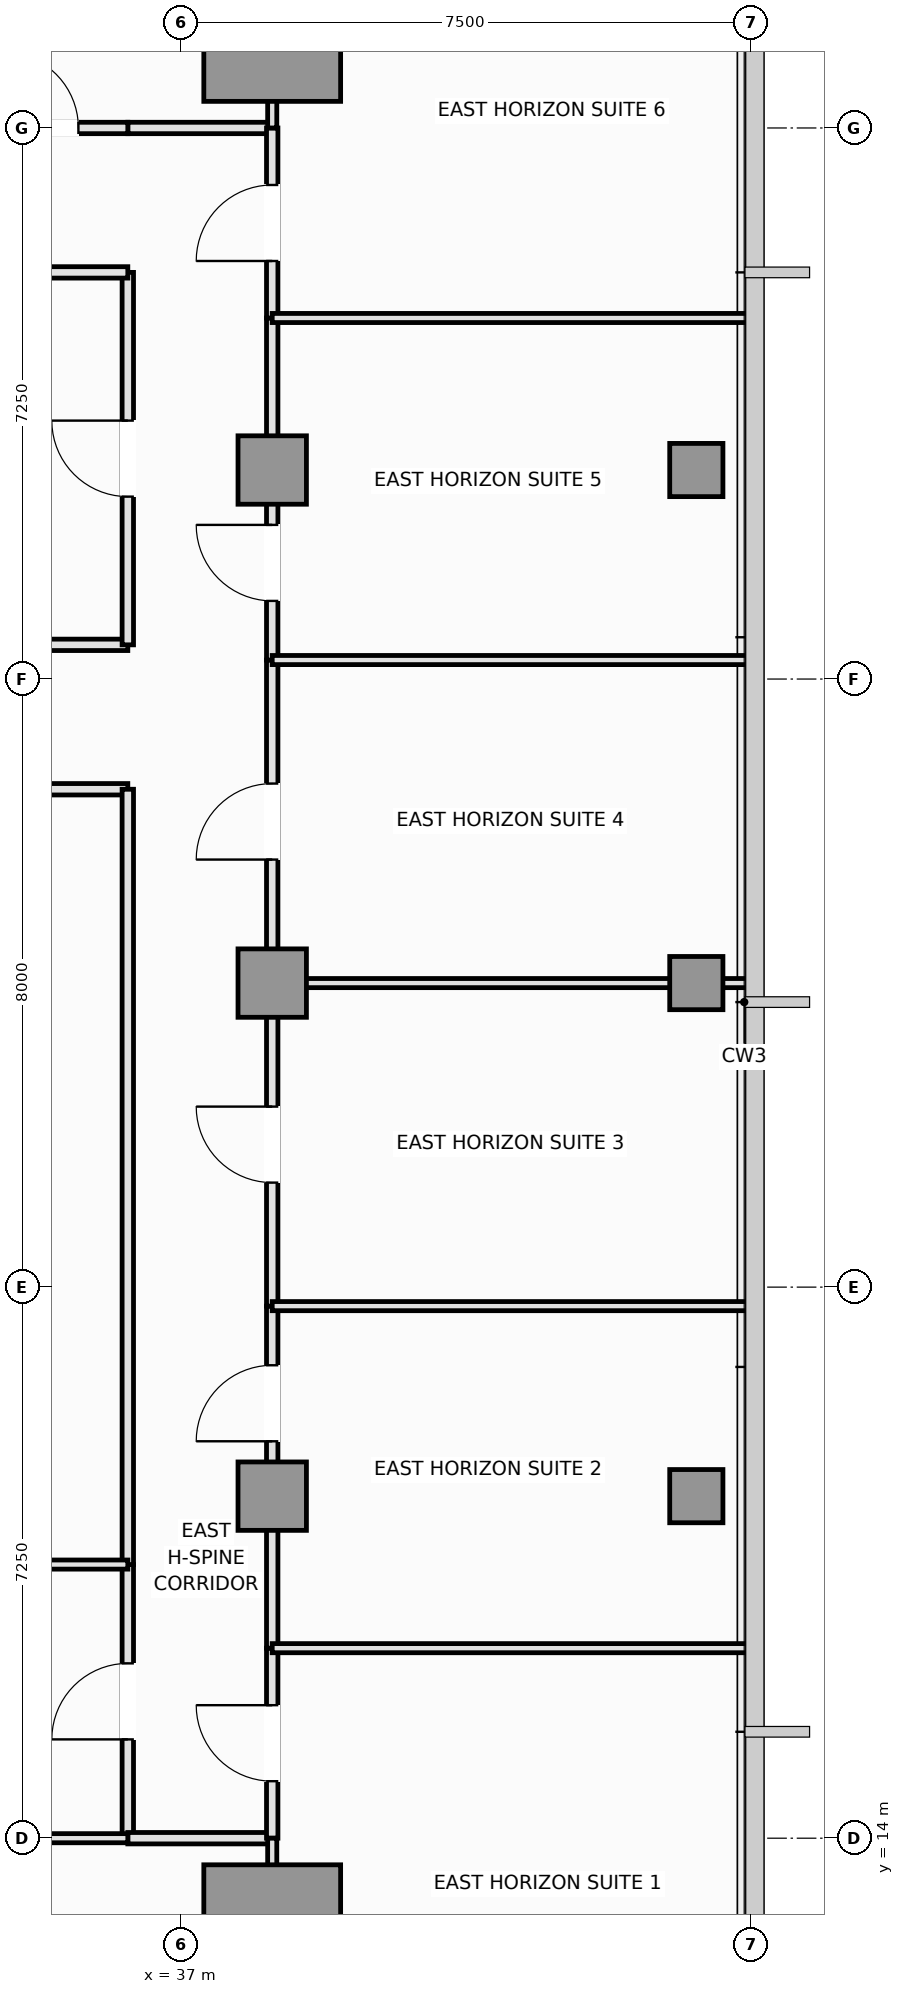
"""IFC4 building model, lengths in metres.
Left out: names, types, materials, properties, quantities, classifications, styles, units other than length and angle.
Written with IfcOpenShell. Run it as: python <this file> out.ifc"""

import sys

from ifc_helpers import new_model, si_unit, direction, frame, frame_2d, origin, origin_2d, place, context, subcontext, project, spatial, rectangle, extrude, element, fill, save


model = new_model("IFC4")
c1 = context("Model", 3, precision=1e-05, world=origin(), true_north=direction((0.0, 1.0)))
c2 = subcontext(c1, "Body", "Model", "MODEL_VIEW")
j1 = project(units=[si_unit("LENGTHUNIT", "METRE"), si_unit("PLANEANGLEUNIT", "RADIAN")], contexts=[c1])
p1 = place(None, origin())
s1 = spatial("IfcSite", under=j1, at=p1, CompositionType="ELEMENT")
p2 = place(p1, origin())
s2 = spatial("IfcBuilding", under=s1, at=p2, CompositionType="ELEMENT")
p3 = place(p2, frame((0.0, 0.0, 281.2)))
s3 = spatial("IfcBuildingStorey", under=s2, at=p3, CompositionType="ELEMENT", Elevation=281.2)
for number, where, z_axis, x_axis in (
    (1, (38.2, 12.75, 0.0), (0.0, 0.0, 1.0), (1.0, 0.0, 0.0)),
    (2, (38.2, 37.75, 0.0), (0.0, 0.0, 1.0), (1.0, 0.0, 0.0)),
):
    element("IfcColumn", number, at=place(p3, frame(where, z_axis=z_axis, x_axis=x_axis)), inside=s3, PredefinedType="COLUMN", context=c2, shape_type="SweptSolid", body=[
        extrude(rectangle(XDim=1.8, YDim=1.8, at=origin_2d()), origin(), (0.0, 0.0, 1.0), 3.55),
    ])
for number, where, z_axis, x_axis in (
    (3, (38.2, 18.5, 0.0), (0.0, 0.0, 1.0), (1.0, 0.0, 0.0)),
    (4, (38.2, 25.25, 0.0), (0.0, 0.0, 1.0), (1.0, 0.0, 0.0)),
    (5, (38.2, 32.0, 0.0), (0.0, 0.0, 1.0), (1.0, 0.0, 0.0)),
):
    element("IfcColumn", number, at=place(p3, frame(where, z_axis=z_axis, x_axis=x_axis)), inside=s3, PredefinedType="COLUMN", context=c2, shape_type="SweptSolid", body=[
        extrude(rectangle(XDim=0.9, YDim=0.9, at=origin_2d()), origin(), (0.0, 0.0, 1.0), 3.55),
    ])
for number, where, z_axis, x_axis in (
    (6, (43.78, 18.5, 0.0), (0.0, 0.0, 1.0), (1.0, 0.0, 0.0)),
    (7, (43.78, 25.25, 0.0), (0.0, 0.0, 1.0), (1.0, 0.0, 0.0)),
    (8, (43.78, 32.0, 0.0), (0.0, 0.0, 1.0), (1.0, 0.0, 0.0)),
):
    element("IfcColumn", number, at=place(p3, frame(where, z_axis=z_axis, x_axis=x_axis)), inside=s3, PredefinedType="COLUMN", context=c2, shape_type="SweptSolid", body=[
        extrude(rectangle(XDim=0.7, YDim=0.7, at=origin_2d()), origin(), (0.0, 0.0, 1.0), 3.55),
    ])
p4 = place(p3, frame((26.79, 29.7, 0.0), z_axis=(0.0, 0.0, 1.0), x_axis=(1.0, 0.0, 0.0)))
e9 = element("IfcWall", 9, at=p4, inside=s3, PredefinedType="PARTITIONING", context=c2, shape_type="SweptSolid", body=[
    extrude(rectangle(XDim=9.51, YDim=0.15, at=frame_2d((4.755, 0.0))), origin(), (0.0, 0.0, 1.0), 3.39),
])
p5 = place(p3, frame((23.5, 27.8, 0.0), z_axis=(0.0, 0.0, 1.0), x_axis=(1.0, 0.0, 0.0)))
e10 = element("IfcWall", 10, at=p5, inside=s3, PredefinedType="PARTITIONING", context=c2, shape_type="SweptSolid", body=[
    extrude(rectangle(XDim=12.8, YDim=0.15, at=frame_2d((6.4, 0.0))), origin(), (0.0, 0.0, 1.0), 3.39),
])
p6 = place(p5, frame((5.9, 0.0, 0.0)))
e11 = element("IfcOpeningElement", 11, at=p6, cuts=e10, PredefinedType="OPENING", context=c2, shape_type="SweptSolid", body=[
    extrude(rectangle(XDim=1.0, YDim=2.15, at=frame_2d((0.5, 1.075))), frame((0.0, 0.085, 0.0), z_axis=(0.0, -1.0, 0.0), x_axis=(1.0, 0.0, 0.0)), (0.0, 0.0, 1.0), 0.17),
])
p7 = place(p3, frame((36.3, 29.7, 0.0), z_axis=(0.0, 0.0, 1.0), x_axis=(0.0, 1.0, 0.0)))
e12 = element("IfcWall", 12, at=p7, inside=s3, PredefinedType="PARTITIONING", context=c2, shape_type="SweptSolid", body=[
    extrude(rectangle(XDim=4.9, YDim=0.15, at=frame_2d((2.45, 0.0))), origin(), (0.0, 0.0, 1.0), 3.39),
])
p8 = place(p7, frame((1.95, 0.0, 0.0)))
e13 = element("IfcOpeningElement", 13, at=p8, cuts=e12, PredefinedType="OPENING", context=c2, shape_type="SweptSolid", body=[
    extrude(rectangle(XDim=1.0, YDim=2.15, at=frame_2d((0.5, 1.075))), frame((0.0, 0.085, 0.0), z_axis=(0.0, -1.0, 0.0), x_axis=(1.0, 0.0, 0.0)), (0.0, 0.0, 1.0), 0.17),
])
p9 = place(p3, frame((36.3, 14.0, 0.0), z_axis=(0.0, 0.0, 1.0), x_axis=(0.0, 1.0, 0.0)))
e14 = element("IfcWall", 14, at=p9, inside=s3, PredefinedType="PARTITIONING", context=c2, shape_type="SweptSolid", body=[
    extrude(rectangle(XDim=3.6, YDim=0.15, at=frame_2d((1.8, 0.0))), origin(), (0.0, 0.0, 1.0), 3.39),
])
p10 = place(p9, frame((1.3, 0.0, 0.0)))
e15 = element("IfcOpeningElement", 15, at=p10, cuts=e14, PredefinedType="OPENING", context=c2, shape_type="SweptSolid", body=[
    extrude(rectangle(XDim=1.0, YDim=2.15, at=frame_2d((0.5, 1.075))), frame((0.0, 0.085, 0.0), z_axis=(0.0, -1.0, 0.0), x_axis=(1.0, 0.0, 0.0)), (0.0, 0.0, 1.0), 0.17),
])
p11 = place(p3, frame((36.3, 17.6, 0.0), z_axis=(0.0, 0.0, 1.0), x_axis=(0.0, 1.0, 0.0)))
e16 = element("IfcWall", 16, at=p11, inside=s3, PredefinedType="PARTITIONING", context=c2, shape_type="SweptSolid", body=[
    extrude(rectangle(XDim=10.2, YDim=0.15, at=frame_2d((5.1, 0.0))), origin(), (0.0, 0.0, 1.0), 3.39),
])
for number, where, z_axis, x_axis in (
    (17, (36.3, 14.0, 0.0), (0.0, 0.0, 1.0), (1.0, 0.0, 0.0)),
    (18, (36.3, 36.5, 0.0), (0.0, 0.0, 1.0), (1.0, 0.0, 0.0)),
):
    element("IfcWall", number, at=place(p3, frame(where, z_axis=z_axis, x_axis=x_axis)), inside=s3, PredefinedType="PARTITIONING", context=c2, shape_type="SweptSolid", body=[
        extrude(rectangle(XDim=1.9, YDim=0.15, at=frame_2d((0.95, 0.0))), origin(), (0.0, 0.0, 1.0), 3.39),
    ])
p12 = place(p3, frame((38.2, 14.0, 0.0), z_axis=(0.0, 0.0, 1.0), x_axis=(0.0, 1.0, 0.0)))
e19 = element("IfcWall", 19, at=p12, inside=s3, PredefinedType="PARTITIONING", context=c2, shape_type="SweptSolid", body=[
    extrude(rectangle(XDim=2.5, YDim=0.15, at=frame_2d((1.25, 0.0))), origin(), (0.0, 0.0, 1.0), 2.99),
])
p13 = place(p12, frame((0.75, 0.0, 0.0)))
e20 = element("IfcOpeningElement", 20, at=p13, cuts=e19, PredefinedType="OPENING", context=c2, shape_type="SweptSolid", body=[
    extrude(rectangle(XDim=1.0, YDim=2.15, at=frame_2d((0.5, 1.075))), frame((0.0, 0.085, 0.0), z_axis=(0.0, -1.0, 0.0), x_axis=(1.0, 0.0, 0.0)), (0.0, 0.0, 1.0), 0.17),
])
p14 = place(p3, frame((38.2, 16.5, 0.0), z_axis=(0.0, 0.0, 1.0), x_axis=(0.0, 1.0, 0.0)))
e21 = element("IfcWall", 21, at=p14, inside=s3, PredefinedType="PARTITIONING", context=c2, shape_type="SweptSolid", body=[
    extrude(rectangle(XDim=4.5, YDim=0.15, at=frame_2d((2.25, 0.0))), origin(), (0.0, 0.0, 1.0), 2.99),
])
p15 = place(p14, frame((2.722, 0.0, 0.0)))
e22 = element("IfcOpeningElement", 22, at=p15, cuts=e21, PredefinedType="OPENING", context=c2, shape_type="SweptSolid", body=[
    extrude(rectangle(XDim=1.0, YDim=2.15, at=frame_2d((0.5, 1.075))), frame((0.0, 0.085, 0.0), z_axis=(0.0, -1.0, 0.0), x_axis=(1.0, 0.0, 0.0)), (0.0, 0.0, 1.0), 0.17),
])
p16 = place(p3, frame((38.2, 21.0, 0.0), z_axis=(0.0, 0.0, 1.0), x_axis=(0.0, 1.0, 0.0)))
e23 = element("IfcWall", 23, at=p16, inside=s3, PredefinedType="PARTITIONING", context=c2, shape_type="SweptSolid", body=[
    extrude(rectangle(XDim=4.25, YDim=0.15, at=frame_2d((2.125, 0.0))), origin(), (0.0, 0.0, 1.0), 2.99),
])
p17 = place(p16, frame((1.625, 0.0, 0.0)))
e24 = element("IfcOpeningElement", 24, at=p17, cuts=e23, PredefinedType="OPENING", context=c2, shape_type="SweptSolid", body=[
    extrude(rectangle(XDim=1.0, YDim=2.15, at=frame_2d((0.5, 1.075))), frame((0.0, 0.085, 0.0), z_axis=(0.0, -1.0, 0.0), x_axis=(1.0, 0.0, 0.0)), (0.0, 0.0, 1.0), 0.17),
])
p18 = place(p3, frame((38.2, 25.25, 0.0), z_axis=(0.0, 0.0, 1.0), x_axis=(0.0, 1.0, 0.0)))
e25 = element("IfcWall", 25, at=p18, inside=s3, PredefinedType="PARTITIONING", context=c2, shape_type="SweptSolid", body=[
    extrude(rectangle(XDim=4.25, YDim=0.15, at=frame_2d((2.125, 0.0))), origin(), (0.0, 0.0, 1.0), 2.99),
])
p19 = place(p18, frame((1.625, 0.0, 0.0)))
e26 = element("IfcOpeningElement", 26, at=p19, cuts=e25, PredefinedType="OPENING", context=c2, shape_type="SweptSolid", body=[
    extrude(rectangle(XDim=1.0, YDim=2.15, at=frame_2d((0.5, 1.075))), frame((0.0, 0.085, 0.0), z_axis=(0.0, -1.0, 0.0), x_axis=(1.0, 0.0, 0.0)), (0.0, 0.0, 1.0), 0.17),
])
p20 = place(p3, frame((38.2, 29.5, 0.0), z_axis=(0.0, 0.0, 1.0), x_axis=(0.0, 1.0, 0.0)))
e27 = element("IfcWall", 27, at=p20, inside=s3, PredefinedType="PARTITIONING", context=c2, shape_type="SweptSolid", body=[
    extrude(rectangle(XDim=4.5, YDim=0.15, at=frame_2d((2.25, 0.0))), origin(), (0.0, 0.0, 1.0), 2.99),
])
p21 = place(p20, frame((0.778, 0.0, 0.0)))
e28 = element("IfcOpeningElement", 28, at=p21, cuts=e27, PredefinedType="OPENING", context=c2, shape_type="SweptSolid", body=[
    extrude(rectangle(XDim=1.0, YDim=2.15, at=frame_2d((0.5, 1.075))), frame((0.0, 0.085, 0.0), z_axis=(0.0, -1.0, 0.0), x_axis=(1.0, 0.0, 0.0)), (0.0, 0.0, 1.0), 0.17),
])
p22 = place(p3, frame((38.2, 34.0, 0.0), z_axis=(0.0, 0.0, 1.0), x_axis=(0.0, 1.0, 0.0)))
e29 = element("IfcWall", 29, at=p22, inside=s3, PredefinedType="PARTITIONING", context=c2, shape_type="SweptSolid", body=[
    extrude(rectangle(XDim=2.5, YDim=0.15, at=frame_2d((1.25, 0.0))), origin(), (0.0, 0.0, 1.0), 2.99),
])
p23 = place(p22, frame((0.75, 0.0, 0.0)))
e30 = element("IfcOpeningElement", 30, at=p23, cuts=e29, PredefinedType="OPENING", context=c2, shape_type="SweptSolid", body=[
    extrude(rectangle(XDim=1.0, YDim=2.15, at=frame_2d((0.5, 1.075))), frame((0.0, 0.085, 0.0), z_axis=(0.0, -1.0, 0.0), x_axis=(1.0, 0.0, 0.0)), (0.0, 0.0, 1.0), 0.17),
])
p24 = place(p3, frame((26.79, 34.6, 0.0), z_axis=(0.0, 0.0, 1.0), x_axis=(1.0, 0.0, 0.0)))
e31 = element("IfcWall", 31, at=p24, inside=s3, PredefinedType="PARTITIONING", context=c2, shape_type="SweptSolid", body=[
    extrude(rectangle(XDim=9.51, YDim=0.15, at=frame_2d((4.755, 0.0))), origin(), (0.0, 0.0, 1.0), 3.39),
])
p25 = place(p3, frame((34.0, 36.5, 0.0), z_axis=(0.0, 0.0, 1.0), x_axis=(1.0, 0.0, 0.0)))
e32 = element("IfcWall", 32, at=p25, inside=s3, PredefinedType="PARTITIONING", context=c2, shape_type="SweptSolid", body=[
    extrude(rectangle(XDim=2.3, YDim=0.15, at=frame_2d((1.15, 0.0))), origin(), (0.0, 0.0, 1.0), 3.39),
])
p26 = place(p25, frame((0.65, 0.0, 0.0)))
e33 = element("IfcOpeningElement", 33, at=p26, cuts=e32, PredefinedType="OPENING", context=c2, shape_type="SweptSolid", body=[
    extrude(rectangle(XDim=1.0, YDim=2.15, at=frame_2d((0.5, 1.075))), frame((0.0, 0.085, 0.0), z_axis=(0.0, -1.0, 0.0), x_axis=(1.0, 0.0, 0.0)), (0.0, 0.0, 1.0), 0.17),
])
for number, where, z_axis, x_axis in (
    (34, (23.5, 17.6, 0.0), (0.0, 0.0, 1.0), (1.0, 0.0, 0.0)),
    (35, (23.5, 14.0, 0.0), (0.0, 0.0, 1.0), (1.0, 0.0, 0.0)),
):
    element("IfcWall", number, at=place(p3, frame(where, z_axis=z_axis, x_axis=x_axis)), inside=s3, PredefinedType="PARTITIONING", context=c2, shape_type="SweptSolid", body=[
        extrude(rectangle(XDim=12.8, YDim=0.12, at=frame_2d((6.4, 0.0))), origin(), (0.0, 0.0, 1.0), 3.39),
    ])
p27 = place(p3, frame((38.2, 6.01, 0.0), z_axis=(0.0, 0.0, 1.0), x_axis=(0.0, 1.0, 0.0)))
e36 = element("IfcWall", 36, at=p27, inside=s3, PredefinedType="PARTITIONING", context=c2, shape_type="SweptSolid", body=[
    extrude(rectangle(XDim=7.99, YDim=0.12, at=frame_2d((3.995, 0.0))), origin(), (0.0, 0.0, 1.0), 2.99),
])
p28 = place(p3, frame((38.2, 36.5, 0.0), z_axis=(0.0, 0.0, 1.0), x_axis=(0.0, 1.0, 0.0)))
e37 = element("IfcWall", 37, at=p28, inside=s3, PredefinedType="PARTITIONING", context=c2, shape_type="SweptSolid", body=[
    extrude(rectangle(XDim=7.49, YDim=0.12, at=frame_2d((3.745, 0.0))), origin(), (0.0, 0.0, 1.0), 2.99),
])
for number, where, z_axis, x_axis in (
    (38, (38.2, 16.5, 0.0), (0.0, 0.0, 1.0), (1.0, 0.0, 0.0)),
    (39, (38.2, 21.0, 0.0), (0.0, 0.0, 1.0), (1.0, 0.0, 0.0)),
):
    element("IfcWall", number, at=place(p3, frame(where, z_axis=z_axis, x_axis=x_axis)), inside=s3, PredefinedType="PARTITIONING", context=c2, shape_type="SweptSolid", body=[
        extrude(rectangle(XDim=6.29, YDim=0.12, at=frame_2d((3.145, 0.0))), origin(), (0.0, 0.0, 1.0), 3.39),
    ])
p29 = place(p3, frame((38.2, 25.25, 0.0), z_axis=(0.0, 0.0, 1.0), x_axis=(1.0, 0.0, 0.0)))
e40 = element("IfcWall", 40, at=p29, inside=s3, PredefinedType="PARTITIONING", context=c2, shape_type="SweptSolid", body=[
    extrude(rectangle(XDim=6.29, YDim=0.12, at=frame_2d((3.145, 0.0))), origin(), (0.0, 0.0, 1.0), 2.94),
])
for number, where, z_axis, x_axis in (
    (41, (38.2, 29.5, 0.0), (0.0, 0.0, 1.0), (1.0, 0.0, 0.0)),
    (42, (38.2, 34.0, 0.0), (0.0, 0.0, 1.0), (1.0, 0.0, 0.0)),
):
    element("IfcWall", number, at=place(p3, frame(where, z_axis=z_axis, x_axis=x_axis)), inside=s3, PredefinedType="PARTITIONING", context=c2, shape_type="SweptSolid", body=[
        extrude(rectangle(XDim=6.29, YDim=0.12, at=frame_2d((3.145, 0.0))), origin(), (0.0, 0.0, 1.0), 3.39),
    ])
p30 = place(p8, origin())
e43 = element("IfcDoor", 43, at=p30, inside=s3, OperationType="SINGLE_SWING_RIGHT", PredefinedType="DOOR", context=c2, shape_type="SweptSolid", body=[
    extrude(rectangle(XDim=1.0, YDim=2.15, at=frame_2d((0.5, 1.075))), frame((0.0, 0.025, 0.0), z_axis=(0.0, -1.0, 0.0), x_axis=(1.0, 0.0, 0.0)), (0.0, 0.0, 1.0), 0.05),
])
fill(e13, e43)
p31 = place(p10, origin())
e44 = element("IfcDoor", 44, at=p31, inside=s3, OperationType="SINGLE_SWING_LEFT", PredefinedType="DOOR", context=c2, shape_type="SweptSolid", body=[
    extrude(rectangle(XDim=1.0, YDim=2.15, at=frame_2d((0.5, 1.075))), frame((0.0, 0.025, 0.0), z_axis=(0.0, -1.0, 0.0), x_axis=(1.0, 0.0, 0.0)), (0.0, 0.0, 1.0), 0.05),
])
fill(e15, e44)
p32 = place(p13, origin())
e45 = element("IfcDoor", 45, at=p32, inside=s3, OperationType="SINGLE_SWING_RIGHT", PredefinedType="DOOR", context=c2, shape_type="SweptSolid", body=[
    extrude(rectangle(XDim=1.0, YDim=2.15, at=frame_2d((0.5, 1.075))), frame((0.0, 0.025, 0.0), z_axis=(0.0, -1.0, 0.0), x_axis=(1.0, 0.0, 0.0)), (0.0, 0.0, 1.0), 0.05),
])
fill(e20, e45)
p33 = place(p15, origin())
e46 = element("IfcDoor", 46, at=p33, inside=s3, OperationType="SINGLE_SWING_LEFT", PredefinedType="DOOR", context=c2, shape_type="SweptSolid", body=[
    extrude(rectangle(XDim=1.0, YDim=2.15, at=frame_2d((0.5, 1.075))), frame((0.0, 0.025, 0.0), z_axis=(0.0, -1.0, 0.0), x_axis=(1.0, 0.0, 0.0)), (0.0, 0.0, 1.0), 0.05),
])
fill(e22, e46)
p34 = place(p17, origin())
e47 = element("IfcDoor", 47, at=p34, inside=s3, OperationType="SINGLE_SWING_RIGHT", PredefinedType="DOOR", context=c2, shape_type="SweptSolid", body=[
    extrude(rectangle(XDim=1.0, YDim=2.15, at=frame_2d((0.5, 1.075))), frame((0.0, 0.025, 0.0), z_axis=(0.0, -1.0, 0.0), x_axis=(1.0, 0.0, 0.0)), (0.0, 0.0, 1.0), 0.05),
])
fill(e24, e47)
p35 = place(p19, origin())
e48 = element("IfcDoor", 48, at=p35, inside=s3, OperationType="SINGLE_SWING_LEFT", PredefinedType="DOOR", context=c2, shape_type="SweptSolid", body=[
    extrude(rectangle(XDim=1.0, YDim=2.15, at=frame_2d((0.5, 1.075))), frame((0.0, 0.025, 0.0), z_axis=(0.0, -1.0, 0.0), x_axis=(1.0, 0.0, 0.0)), (0.0, 0.0, 1.0), 0.05),
])
fill(e26, e48)
p36 = place(p21, origin())
e49 = element("IfcDoor", 49, at=p36, inside=s3, OperationType="SINGLE_SWING_RIGHT", PredefinedType="DOOR", context=c2, shape_type="SweptSolid", body=[
    extrude(rectangle(XDim=1.0, YDim=2.15, at=frame_2d((0.5, 1.075))), frame((0.0, 0.025, 0.0), z_axis=(0.0, -1.0, 0.0), x_axis=(1.0, 0.0, 0.0)), (0.0, 0.0, 1.0), 0.05),
])
fill(e28, e49)
p37 = place(p23, origin())
e50 = element("IfcDoor", 50, at=p37, inside=s3, OperationType="SINGLE_SWING_LEFT", PredefinedType="DOOR", context=c2, shape_type="SweptSolid", body=[
    extrude(rectangle(XDim=1.0, YDim=2.15, at=frame_2d((0.5, 1.075))), frame((0.0, 0.025, 0.0), z_axis=(0.0, -1.0, 0.0), x_axis=(1.0, 0.0, 0.0)), (0.0, 0.0, 1.0), 0.05),
])
fill(e30, e50)
p38 = place(p26, origin())
e51 = element("IfcDoor", 51, at=p38, inside=s3, OperationType="SINGLE_SWING_LEFT", PredefinedType="DOOR", context=c2, shape_type="SweptSolid", body=[
    extrude(rectangle(XDim=1.0, YDim=2.15, at=frame_2d((0.5, 1.075))), frame((0.0, 0.025, 0.0), z_axis=(0.0, -1.0, 0.0), x_axis=(1.0, 0.0, 0.0)), (0.0, 0.0, 1.0), 0.05),
])
fill(e33, e51)
save(model, sys.argv[1])
